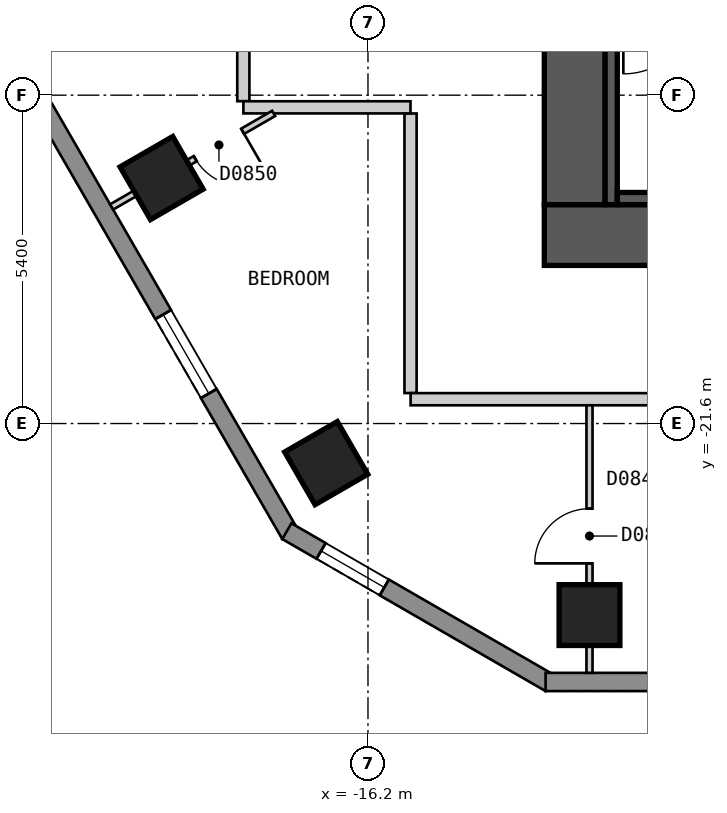
"""IFC4 building model, lengths in metres.
Left out: names, types, materials, properties, quantities, classifications, styles, units other than length and angle.
Written with IfcOpenShell. Run it as: python <this file> out.ifc"""

import sys

from ifc_helpers import new_model, si_unit, direction, frame, frame_2d, origin, origin_2d, place, context, subcontext, project, spatial, polyline, rectangle, outline, extrude, element, fill, save


model = new_model("IFC4")
c1 = context("Model", 3, precision=1e-05, world=origin(), true_north=direction((0.0, 1.0)))
c2 = subcontext(c1, "Body", "Model", "MODEL_VIEW")
j1 = project(units=[si_unit("LENGTHUNIT", "METRE"), si_unit("PLANEANGLEUNIT", "RADIAN")], contexts=[c1])
p1 = place(None, origin())
s1 = spatial("IfcSite", under=j1, at=p1, CompositionType="ELEMENT")
p2 = place(p1, origin())
s2 = spatial("IfcBuilding", under=s1, at=p2, CompositionType="ELEMENT")
p3 = place(p2, frame((0.0, 0.0, 72.0)))
s3 = spatial("IfcBuildingStorey", under=s2, at=p3, CompositionType="ELEMENT", Elevation=72.0)
for number, where, z_axis, x_axis in (
    (1, (-19.594, -17.563, 0.0), (0.0, 0.0, 1.0), (0.5, -0.866, 0.0)),
    (2, (-16.887, -22.251, 0.0), (0.0, 0.0, 1.0), (0.5, -0.866, 0.0)),
    (3, (-12.557, -24.75, 0.0), (0.0, 0.0, 1.0), (1.0, 0.0, 0.0)),
):
    element("IfcColumn", number, at=place(p3, frame(where, z_axis=z_axis, x_axis=x_axis)), inside=s3, PredefinedType="COLUMN", context=c2, shape_type="SweptSolid", body=[
        extrude(rectangle(XDim=1.0, YDim=1.0, at=origin_2d()), origin(), (0.0, 0.0, 1.0), 3.0),
    ])
p4 = place(p3, frame((-13.3, -18.5, 0.0), z_axis=(0.0, 0.0, 1.0), x_axis=(1.0, 0.0, 0.0)))
e4 = element("IfcWall", 4, at=p4, inside=s3, PredefinedType="SHEAR", context=c2, shape_type="SweptSolid", body=[
    extrude(rectangle(XDim=26.6, YDim=1.0, at=frame_2d((13.3, 0.0))), origin(), (0.0, 0.0, 1.0), 2.7),
])
p5 = place(p3, frame((-12.8, -18.0, 0.0), z_axis=(0.0, 0.0, 1.0), x_axis=(0.0, 1.0, 0.0)))
e5 = element("IfcWall", 5, at=p5, inside=s3, PredefinedType="SHEAR", context=c2, shape_type="SweptSolid", body=[
    extrude(rectangle(XDim=12.0, YDim=1.0, at=frame_2d((6.0, 0.0))), origin(), (0.0, 0.0, 1.0), 2.7),
])
p6 = place(p5, frame((3.8, 0.0, 0.0)))
e6 = element("IfcOpeningElement", 6, at=p6, cuts=e5, PredefinedType="OPENING", context=c2, shape_type="SweptSolid", body=[
    extrude(rectangle(XDim=1.2, YDim=2.1, at=frame_2d((0.6, 1.05))), frame((0.0, 0.51, 0.0), z_axis=(0.0, -1.0, 0.0), x_axis=(1.0, 0.0, 0.0)), (0.0, 0.0, 1.0), 1.02),
])
p7 = place(p3, frame((-29.027, -3.425, 0.0), z_axis=(0.0, 0.0, 1.0), x_axis=(0.500035407905, -0.866004960056, 0.0)))
e7 = element("IfcWall", 7, at=p7, inside=s3, PredefinedType="SOLIDWALL", context=c2, shape_type="SweptSolid", body=[
    extrude(outline(polyline([(0.0, -0.15), (23.094, -0.15), (23.014, 0.15), (0.08, 0.15), (0.0, -0.15)])), origin(), (0.0, 0.0, 1.0), 2.7),
])
p8 = place(p7, frame((2.677, 0.0, 0.15)))
e8 = element("IfcOpeningElement", 8, at=p8, cuts=e7, PredefinedType="OPENING", context=c2, shape_type="SweptSolid", body=[
    extrude(rectangle(XDim=1.5, YDim=2.1, at=frame_2d((0.75, 1.05))), frame((0.0, 0.16, 0.0), z_axis=(0.0, -1.0, 0.0), x_axis=(1.0, 0.0, 0.0)), (0.0, 0.0, 1.0), 0.32),
])
p9 = place(p7, frame((8.091, 0.0, 0.15)))
e9 = element("IfcOpeningElement", 9, at=p9, cuts=e7, PredefinedType="OPENING", context=c2, shape_type="SweptSolid", body=[
    extrude(rectangle(XDim=1.5, YDim=2.1, at=frame_2d((0.75, 1.05))), frame((0.0, 0.16, 0.0), z_axis=(0.0, -1.0, 0.0), x_axis=(1.0, 0.0, 0.0)), (0.0, 0.0, 1.0), 0.32),
])
p10 = place(p7, frame((13.504, 0.0, 0.15)))
e10 = element("IfcOpeningElement", 10, at=p10, cuts=e7, PredefinedType="OPENING", context=c2, shape_type="SweptSolid", body=[
    extrude(rectangle(XDim=1.5, YDim=2.1, at=frame_2d((0.75, 1.05))), frame((0.0, 0.16, 0.0), z_axis=(0.0, -1.0, 0.0), x_axis=(1.0, 0.0, 0.0)), (0.0, 0.0, 1.0), 0.32),
])
p11 = place(p7, frame((18.917, 0.0, 0.15)))
e11 = element("IfcOpeningElement", 11, at=p11, cuts=e7, PredefinedType="OPENING", context=c2, shape_type="SweptSolid", body=[
    extrude(rectangle(XDim=1.5, YDim=2.1, at=frame_2d((0.75, 1.05))), frame((0.0, 0.16, 0.0), z_axis=(0.0, -1.0, 0.0), x_axis=(1.0, 0.0, 0.0)), (0.0, 0.0, 1.0), 0.32),
])
p12 = place(p3, frame((-17.534, -23.37, 0.0), z_axis=(0.0, 0.0, 1.0), x_axis=(0.866010750942, -0.50002537861, 0.0)))
e12 = element("IfcWall", 12, at=p12, inside=s3, PredefinedType="SOLIDWALL", context=c2, shape_type="SweptSolid", body=[
    extrude(outline(polyline([(0.0, -0.15), (5.0, -0.15), (4.919, 0.15), (0.08, 0.15), (0.0, -0.15)])), origin(), (0.0, 0.0, 1.0), 2.7),
])
p13 = place(p12, frame((0.65, 0.0, 0.15)))
e13 = element("IfcOpeningElement", 13, at=p13, cuts=e12, PredefinedType="OPENING", context=c2, shape_type="SweptSolid", body=[
    extrude(rectangle(XDim=1.2, YDim=2.1, at=frame_2d((0.6, 1.05))), frame((0.0, 0.16, 0.0), z_axis=(0.0, -1.0, 0.0), x_axis=(1.0, 0.0, 0.0)), (0.0, 0.0, 1.0), 0.32),
])
p14 = place(p3, frame((-13.279, -25.85, 0.0), z_axis=(0.0, 0.0, 1.0), x_axis=(1.0, 0.0, 0.0)))
e14 = element("IfcWall", 14, at=p14, inside=s3, PredefinedType="SOLIDWALL", context=c2, shape_type="SweptSolid", body=[
    extrude(outline(polyline([(0.0, -0.15), (26.558, -0.15), (26.478, 0.15), (0.08, 0.15), (0.0, -0.15)])), origin(), (0.0, 0.0, 1.0), 2.7),
])
p15 = place(p14, frame((2.483, 0.0, 0.15)))
e15 = element("IfcOpeningElement", 15, at=p15, cuts=e14, PredefinedType="OPENING", context=c2, shape_type="SweptSolid", body=[
    extrude(rectangle(XDim=1.5, YDim=2.1, at=frame_2d((0.75, 1.05))), frame((0.0, 0.16, 0.0), z_axis=(0.0, -1.0, 0.0), x_axis=(1.0, 0.0, 0.0)), (0.0, 0.0, 1.0), 0.32),
])
p16 = place(p14, frame((7.507, 0.0, 0.15)))
e16 = element("IfcOpeningElement", 16, at=p16, cuts=e14, PredefinedType="OPENING", context=c2, shape_type="SweptSolid", body=[
    extrude(rectangle(XDim=1.5, YDim=2.1, at=frame_2d((0.75, 1.05))), frame((0.0, 0.16, 0.0), z_axis=(0.0, -1.0, 0.0), x_axis=(1.0, 0.0, 0.0)), (0.0, 0.0, 1.0), 0.32),
])
p17 = place(p14, frame((12.529, 0.0, 0.15)))
e17 = element("IfcOpeningElement", 17, at=p17, cuts=e14, PredefinedType="OPENING", context=c2, shape_type="SweptSolid", body=[
    extrude(rectangle(XDim=1.5, YDim=2.1, at=frame_2d((0.75, 1.05))), frame((0.0, 0.16, 0.0), z_axis=(0.0, -1.0, 0.0), x_axis=(1.0, 0.0, 0.0)), (0.0, 0.0, 1.0), 0.32),
])
p18 = place(p14, frame((17.553, 0.0, 0.15)))
e18 = element("IfcOpeningElement", 18, at=p18, cuts=e14, PredefinedType="OPENING", context=c2, shape_type="SweptSolid", body=[
    extrude(rectangle(XDim=1.5, YDim=2.1, at=frame_2d((0.75, 1.05))), frame((0.0, 0.16, 0.0), z_axis=(0.0, -1.0, 0.0), x_axis=(1.0, 0.0, 0.0)), (0.0, 0.0, 1.0), 0.32),
])
p19 = place(p14, frame((22.575, 0.0, 0.15)))
e19 = element("IfcOpeningElement", 19, at=p19, cuts=e14, PredefinedType="OPENING", context=c2, shape_type="SweptSolid", body=[
    extrude(rectangle(XDim=1.5, YDim=2.1, at=frame_2d((0.75, 1.05))), frame((0.0, 0.16, 0.0), z_axis=(0.0, -1.0, 0.0), x_axis=(1.0, 0.0, 0.0)), (0.0, 0.0, 1.0), 0.32),
])
p20 = place(p3, frame((-15.5, -16.501, 0.0), z_axis=(0.0, 0.0, 1.0), x_axis=(0.0, -1.0, 0.0)))
e20 = element("IfcWall", 20, at=p20, inside=s3, PredefinedType="PARTITIONING", context=c2, shape_type="SweptSolid", body=[
    extrude(rectangle(XDim=4.598, YDim=0.2, at=frame_2d((2.299, 0.0))), origin(), (0.0, 0.0, 1.0), 2.7),
])
p21 = place(p3, frame((-18.25, -10.652, 0.0), z_axis=(0.0, 0.0, 1.0), x_axis=(0.0, -1.0, 0.0)))
e21 = element("IfcWall", 21, at=p21, inside=s3, PredefinedType="PARTITIONING", context=c2, shape_type="SweptSolid", body=[
    extrude(rectangle(XDim=5.647, YDim=0.2, at=frame_2d((2.823, 0.0))), origin(), (0.0, 0.0, 1.0), 2.7),
])
p22 = place(p3, frame((-18.249, -16.4, 0.0), z_axis=(0.0, 0.0, 1.0), x_axis=(1.0, 0.0, 0.0)))
e22 = element("IfcWall", 22, at=p22, inside=s3, PredefinedType="PARTITIONING", context=c2, shape_type="SweptSolid", body=[
    extrude(rectangle(XDim=2.748, YDim=0.2, at=frame_2d((1.374, 0.0))), origin(), (0.0, 0.0, 1.0), 2.7),
])
p23 = place(p3, frame((-15.499, -21.2, 0.0), z_axis=(0.0, 0.0, 1.0), x_axis=(1.0, 0.0, 0.0)))
e23 = element("IfcWall", 23, at=p23, inside=s3, PredefinedType="PARTITIONING", context=c2, shape_type="SweptSolid", body=[
    extrude(rectangle(XDim=30.898, YDim=0.2, at=frame_2d((15.449, 0.0))), origin(), (0.0, 0.0, 1.0), 2.7),
])
p24 = place(p23, frame((4.954, 0.0, 0.0)))
e24 = element("IfcOpeningElement", 24, at=p24, cuts=e23, PredefinedType="OPENING", context=c2, shape_type="SweptSolid", body=[
    extrude(rectangle(XDim=1.0, YDim=2.1, at=frame_2d((0.5, 1.05))), frame((0.0, 0.11, 0.0), z_axis=(0.0, -1.0, 0.0), x_axis=(1.0, 0.0, 0.0)), (0.0, 0.0, 1.0), 0.22),
])
p25 = place(p23, frame((20.023, 0.0, 0.0)))
e25 = element("IfcOpeningElement", 25, at=p25, cuts=e23, PredefinedType="OPENING", context=c2, shape_type="SweptSolid", body=[
    extrude(rectangle(XDim=1.0, YDim=2.1, at=frame_2d((0.5, 1.05))), frame((0.0, 0.11, 0.0), z_axis=(0.0, -1.0, 0.0), x_axis=(1.0, 0.0, 0.0)), (0.0, 0.0, 1.0), 0.22),
])
p26 = place(p23, frame((25.046, 0.0, 0.0)))
e26 = element("IfcOpeningElement", 26, at=p26, cuts=e23, PredefinedType="OPENING", context=c2, shape_type="SweptSolid", body=[
    extrude(rectangle(XDim=1.0, YDim=2.1, at=frame_2d((0.5, 1.05))), frame((0.0, 0.11, 0.0), z_axis=(0.0, -1.0, 0.0), x_axis=(1.0, 0.0, 0.0)), (0.0, 0.0, 1.0), 0.22),
])
p27 = place(p3, frame((-12.557, -25.7, 0.0), z_axis=(0.0, 0.0, 1.0), x_axis=(0.0, 1.0, 0.0)))
e27 = element("IfcWall", 27, at=p27, inside=s3, PredefinedType="PARTITIONING", context=c2, shape_type="SweptSolid", body=[
    extrude(rectangle(XDim=4.4, YDim=0.1, at=frame_2d((2.2, 0.0))), origin(), (0.0, 0.0, 1.0), 2.7),
])
p28 = place(p27, frame((1.8, 0.0, 0.0)))
e28 = element("IfcOpeningElement", 28, at=p28, cuts=e27, PredefinedType="OPENING", context=c2, shape_type="SweptSolid", body=[
    extrude(rectangle(XDim=0.9, YDim=2.1, at=frame_2d((0.45, 1.05))), frame((0.0, 0.06, 0.0), z_axis=(0.0, -1.0, 0.0), x_axis=(1.0, 0.0, 0.0)), (0.0, 0.0, 1.0), 0.12),
])
p29 = place(p3, frame((-20.416, -18.038, 0.0), z_axis=(0.0, 0.0, 1.0), x_axis=(0.866026989333, 0.499997253739, 0.0)))
e29 = element("IfcWall", 29, at=p29, inside=s3, PredefinedType="PARTITIONING", context=c2, shape_type="SweptSolid", body=[
    extrude(rectangle(XDim=3.076, YDim=0.1, at=frame_2d((1.538, 0.0))), origin(), (0.0, 0.0, 1.0), 2.7),
])
p30 = place(p29, frame((1.588, 0.0, 0.0)))
e30 = element("IfcOpeningElement", 30, at=p30, cuts=e29, PredefinedType="OPENING", context=c2, shape_type="SweptSolid", body=[
    extrude(rectangle(XDim=0.9, YDim=2.1, at=frame_2d((0.45, 1.05))), frame((0.0, 0.06, 0.0), z_axis=(0.0, -1.0, 0.0), x_axis=(1.0, 0.0, 0.0)), (0.0, 0.0, 1.0), 0.12),
])
p31 = place(p3, frame((-12.2, -18.0, 0.0), z_axis=(0.0, 0.0, 1.0), x_axis=(0.0, 1.0, 0.0)))
e31 = element("IfcWall", 31, at=p31, inside=s3, PredefinedType="SOLIDWALL", context=c2, shape_type="SweptSolid", body=[
    extrude(rectangle(XDim=3.15, YDim=0.2, at=frame_2d((1.575, 0.0))), origin(), (0.0, 0.0, 1.0), 2.7),
])
p32 = place(p3, frame((-12.1, -17.9, 0.0), z_axis=(0.0, 0.0, 1.0), x_axis=(1.0, 0.0, 0.0)))
e32 = element("IfcWall", 32, at=p32, inside=s3, PredefinedType="SOLIDWALL", context=c2, shape_type="SweptSolid", body=[
    extrude(rectangle(XDim=5.4, YDim=0.2, at=frame_2d((2.7, 0.0))), origin(), (0.0, 0.0, 1.0), 2.7),
])
p33 = place(p11, origin())
e33 = element("IfcWindow", 33, at=p33, inside=s3, PartitioningType="SINGLE_PANEL", PredefinedType="WINDOW", context=c2, shape_type="SweptSolid", body=[
    extrude(rectangle(XDim=1.5, YDim=2.1, at=frame_2d((0.75, 1.05))), frame((0.0, 0.03, 0.0), z_axis=(0.0, -1.0, 0.0), x_axis=(1.0, 0.0, 0.0)), (0.0, 0.0, 1.0), 0.06),
])
fill(e11, e33)
p34 = place(p13, origin())
e34 = element("IfcWindow", 34, at=p34, inside=s3, PartitioningType="SINGLE_PANEL", PredefinedType="WINDOW", context=c2, shape_type="SweptSolid", body=[
    extrude(rectangle(XDim=1.2, YDim=2.1, at=frame_2d((0.6, 1.05))), frame((0.0, 0.03, 0.0), z_axis=(0.0, -1.0, 0.0), x_axis=(1.0, 0.0, 0.0)), (0.0, 0.0, 1.0), 0.06),
])
fill(e13, e34)
p35 = place(p28, origin())
e35 = element("IfcDoor", 35, at=p35, inside=s3, OperationType="SINGLE_SWING_LEFT", PredefinedType="DOOR", context=c2, shape_type="SweptSolid", body=[
    extrude(rectangle(XDim=0.9, YDim=2.1, at=frame_2d((0.45, 1.05))), frame((0.0, 0.025, 0.0), z_axis=(0.0, -1.0, 0.0), x_axis=(1.0, 0.0, 0.0)), (0.0, 0.0, 1.0), 0.05),
])
fill(e28, e35)
p36 = place(p30, origin())
e36 = element("IfcDoor", 36, at=p36, inside=s3, OperationType="SINGLE_SWING_RIGHT", PredefinedType="DOOR", context=c2, shape_type="SweptSolid", body=[
    extrude(rectangle(XDim=0.9, YDim=2.1, at=frame_2d((0.45, 1.05))), frame((0.0, 0.025, 0.0), z_axis=(0.0, -1.0, 0.0), x_axis=(1.0, 0.0, 0.0)), (0.0, 0.0, 1.0), 0.05),
])
fill(e30, e36)
save(model, sys.argv[1])
